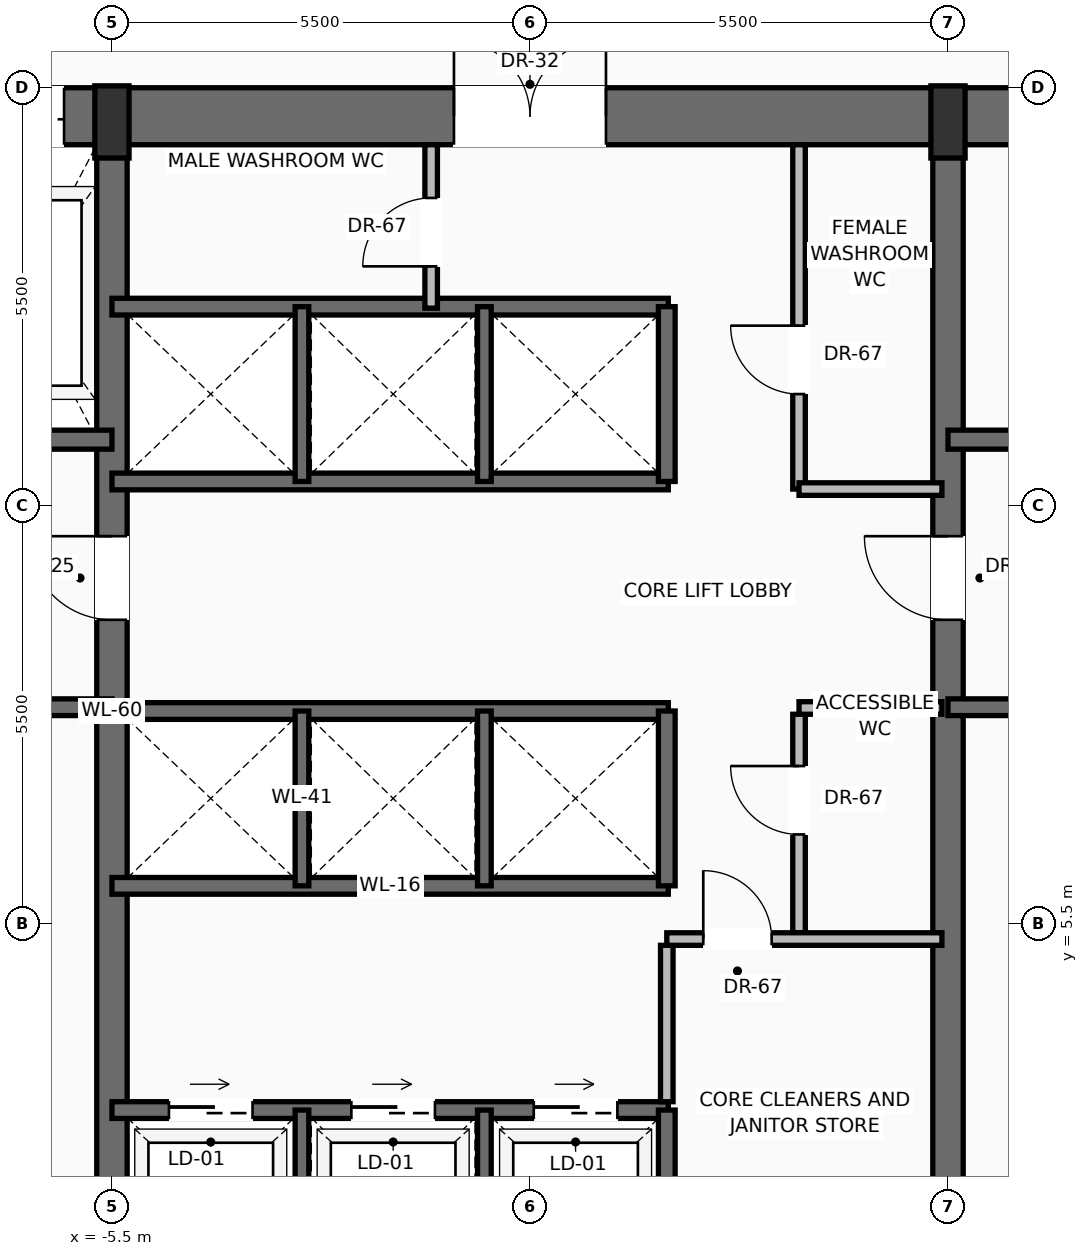
"""IFC4 building model, lengths in metres.
Left out: names, types, materials, properties, quantities, classifications, styles, units other than length and angle.
Written with IfcOpenShell. Run it as: python <this file> out.ifc"""

import sys

from ifc_helpers import new_model, si_unit, direction, frame, frame_2d, origin, origin_2d, place, context, subcontext, project, spatial, rectangle, extrude, source, transform, mapped, element, fill, save


model = new_model("IFC4")
c1 = context("Model", 3, precision=1e-05, world=origin(), true_north=direction((0.0, 1.0)))
c2 = subcontext(c1, "Body", "Model", "MODEL_VIEW")
j1 = project(units=[si_unit("LENGTHUNIT", "METRE"), si_unit("PLANEANGLEUNIT", "RADIAN")], contexts=[c1])
p1 = place(None, origin())
s1 = spatial("IfcSite", under=j1, at=p1, CompositionType="ELEMENT")
p2 = place(p1, origin())
s2 = spatial("IfcBuilding", under=s1, at=p2, CompositionType="ELEMENT")
p3 = place(p2, frame((0.0, 0.0, 113.6)))
s3 = spatial("IfcBuildingStorey", under=s2, at=p3, CompositionType="ELEMENT", Elevation=113.6)
p4 = place(p3, frame((-10.9, 16.125, 0.0), z_axis=(0.0, 0.0, 1.0), x_axis=(1.0, 0.0, 0.0)))
e1 = element("IfcWall", 1, at=p4, inside=s3, PredefinedType="SHEAR", context=c2, shape_type="SweptSolid", body=[
    extrude(rectangle(XDim=21.8, YDim=0.75, at=frame_2d((10.9, 0.0))), origin(), (0.0, 0.0, 1.0), 3.45),
])
p5 = place(p4, frame((3.47, 0.0, 0.0)))
e2 = element("IfcOpeningElement", 2, at=p5, cuts=e1, PredefinedType="OPENING", context=c2, shape_type="SweptSolid", body=[
    extrude(rectangle(XDim=1.3, YDim=2.3, at=frame_2d((0.65, 1.15))), frame((0.0, 0.385, 0.0), z_axis=(0.0, -1.0, 0.0), x_axis=(1.0, 0.0, 0.0)), (0.0, 0.0, 1.0), 0.77),
])
p6 = place(p4, frame((9.9, 0.0, 0.0)))
e3 = element("IfcOpeningElement", 3, at=p6, cuts=e1, PredefinedType="OPENING", context=c2, shape_type="SweptSolid", body=[
    extrude(rectangle(XDim=2.0, YDim=2.4, at=frame_2d((1.0, 1.2))), frame((0.0, 0.385, 0.0), z_axis=(0.0, -1.0, 0.0), x_axis=(1.0, 0.0, 0.0)), (0.0, 0.0, 1.0), 0.77),
])
p7 = place(p3, frame((-5.5, 0.475, 0.0), z_axis=(0.0, 0.0, 1.0), x_axis=(0.0, 1.0, 0.0)))
e4 = element("IfcWall", 4, at=p7, inside=s3, PredefinedType="SHEAR", context=c2, shape_type="SweptSolid", body=[
    extrude(rectangle(XDim=15.65, YDim=0.4, at=frame_2d((7.825, 0.0))), origin(), (0.0, 0.0, 1.0), 3.45),
])
p8 = place(p7, frame((9.025, 0.0, 0.0)))
e5 = element("IfcOpeningElement", 5, at=p8, cuts=e4, PredefinedType="OPENING", context=c2, shape_type="SweptSolid", body=[
    extrude(rectangle(XDim=1.1, YDim=2.2, at=frame_2d((0.55, 1.1))), frame((0.0, 0.21, 0.0), z_axis=(0.0, -1.0, 0.0), x_axis=(1.0, 0.0, 0.0)), (0.0, 0.0, 1.0), 0.42),
])
p9 = place(p3, frame((5.5, 0.475, 0.0), z_axis=(0.0, 0.0, 1.0), x_axis=(0.0, 1.0, 0.0)))
e6 = element("IfcWall", 6, at=p9, inside=s3, PredefinedType="SHEAR", context=c2, shape_type="SweptSolid", body=[
    extrude(rectangle(XDim=15.65, YDim=0.4, at=frame_2d((7.825, 0.0))), origin(), (0.0, 0.0, 1.0), 3.45),
])
p10 = place(p9, frame((9.025, 0.0, 0.0)))
e7 = element("IfcOpeningElement", 7, at=p10, cuts=e6, PredefinedType="OPENING", context=c2, shape_type="SweptSolid", body=[
    extrude(rectangle(XDim=1.1, YDim=2.2, at=frame_2d((0.55, 1.1))), frame((0.0, 0.21, 0.0), z_axis=(0.0, -1.0, 0.0), x_axis=(1.0, 0.0, 0.0)), (0.0, 0.0, 1.0), 0.42),
])
m1 = source(origin(), c2, "Body", "SweptSolid", [
    extrude(rectangle(XDim=0.45, YDim=0.95, at=origin_2d()), origin(), (0.0, 0.0, 1.0), 3.7),
])
for number, where, z_axis, x_axis in (
    (8, (-5.5, 16.05, 0.0), (0.0, 0.0, 1.0), (1.0, 0.0, 0.0)),
    (9, (5.5, 16.05, 0.0), (0.0, 0.0, 1.0), (1.0, 0.0, 0.0)),
):
    element("IfcColumn", number, at=place(p3, frame(where, z_axis=z_axis, x_axis=x_axis)), inside=s3, PredefinedType="PILASTER", context=c2, shape_type="MappedRepresentation", body=[
        mapped(m1, transform((0.0, 0.0, 0.0), scale=1.0)),
    ])
p11 = place(p3, frame((-5.5, 8.35, 0.0), z_axis=(0.0, 0.0, 1.0), x_axis=(-1.0, 0.0, 0.0)))
e10 = element("IfcWall", 10, at=p11, inside=s3, PredefinedType="SOLIDWALL", context=c2, shape_type="SweptSolid", body=[
    extrude(rectangle(XDim=4.65, YDim=0.22, at=frame_2d((2.325, 0.0))), origin(), (0.0, 0.0, 1.0), 3.45),
])
p12 = place(p11, frame((2.5, 0.0, 0.0)))
e11 = element("IfcOpeningElement", 11, at=p12, cuts=e10, PredefinedType="OPENING", context=c2, shape_type="SweptSolid", body=[
    extrude(rectangle(XDim=1.15, YDim=2.2, at=frame_2d((0.575, 1.1))), frame((0.0, 0.12, 0.0), z_axis=(0.0, -1.0, 0.0), x_axis=(1.0, 0.0, 0.0)), (0.0, 0.0, 1.0), 0.24),
])
p13 = place(p3, frame((-5.5, 11.87, 0.0), z_axis=(0.0, 0.0, 1.0), x_axis=(-1.0, 0.0, 0.0)))
e12 = element("IfcWall", 12, at=p13, inside=s3, PredefinedType="SOLIDWALL", context=c2, shape_type="SweptSolid", body=[
    extrude(rectangle(XDim=4.65, YDim=0.25, at=frame_2d((2.325, 0.0))), origin(), (0.0, 0.0, 1.0), 3.45),
])
p14 = place(p13, frame((2.95, 0.0, 0.0)))
e13 = element("IfcOpeningElement", 13, at=p14, cuts=e12, PredefinedType="OPENING", context=c2, shape_type="SweptSolid", body=[
    extrude(rectangle(XDim=1.2, YDim=2.25, at=frame_2d((0.6, 1.125))), frame((0.0, 0.135, 0.0), z_axis=(0.0, -1.0, 0.0), x_axis=(1.0, 0.0, 0.0)), (0.0, 0.0, 1.0), 0.27),
])
p15 = place(p3, frame((10.15, 8.35, 0.0), z_axis=(0.0, 0.0, 1.0), x_axis=(-1.0, 0.0, 0.0)))
e14 = element("IfcWall", 14, at=p15, inside=s3, PredefinedType="SOLIDWALL", context=c2, shape_type="SweptSolid", body=[
    extrude(rectangle(XDim=4.65, YDim=0.22, at=frame_2d((2.325, 0.0))), origin(), (0.0, 0.0, 1.0), 3.45),
])
p16 = place(p15, frame((1.0, 0.0, 0.0)))
e15 = element("IfcOpeningElement", 15, at=p16, cuts=e14, PredefinedType="OPENING", context=c2, shape_type="SweptSolid", body=[
    extrude(rectangle(XDim=1.15, YDim=2.2, at=frame_2d((0.575, 1.1))), frame((0.0, 0.12, 0.0), z_axis=(0.0, -1.0, 0.0), x_axis=(1.0, 0.0, 0.0)), (0.0, 0.0, 1.0), 0.24),
])
p17 = place(p3, frame((10.15, 11.87, 0.0), z_axis=(0.0, 0.0, 1.0), x_axis=(-1.0, 0.0, 0.0)))
e16 = element("IfcWall", 16, at=p17, inside=s3, PredefinedType="SOLIDWALL", context=c2, shape_type="SweptSolid", body=[
    extrude(rectangle(XDim=4.65, YDim=0.25, at=frame_2d((2.325, 0.0))), origin(), (0.0, 0.0, 1.0), 3.45),
])
p18 = place(p17, frame((0.5, 0.0, 0.0)))
e17 = element("IfcOpeningElement", 17, at=p18, cuts=e16, PredefinedType="OPENING", context=c2, shape_type="SweptSolid", body=[
    extrude(rectangle(XDim=1.2, YDim=2.25, at=frame_2d((0.6, 1.125))), frame((0.0, 0.135, 0.0), z_axis=(0.0, -1.0, 0.0), x_axis=(1.0, 0.0, 0.0)), (0.0, 0.0, 1.0), 0.27),
])
p19 = place(p3, frame((-5.5, 3.05, 0.0), z_axis=(0.0, 0.0, 1.0), x_axis=(1.0, 0.0, 0.0)))
e18 = element("IfcWall", 18, at=p19, inside=s3, PredefinedType="SOLIDWALL", context=c2, shape_type="SweptSolid", body=[
    extrude(rectangle(XDim=7.32, YDim=0.22, at=frame_2d((3.66, 0.0))), origin(), (0.0, 0.0, 1.0), 3.45),
])
p20 = place(p19, frame((0.75, 0.0, 0.0)))
e19 = element("IfcOpeningElement", 19, at=p20, cuts=e18, PredefinedType="OPENING", context=c2, shape_type="SweptSolid", body=[
    extrude(rectangle(XDim=1.1, YDim=2.2, at=frame_2d((0.55, 1.1))), frame((0.0, 0.12, 0.0), z_axis=(0.0, -1.0, 0.0), x_axis=(1.0, 0.0, 0.0)), (0.0, 0.0, 1.0), 0.24),
])
p21 = place(p19, frame((3.15, 0.0, 0.0)))
e20 = element("IfcOpeningElement", 20, at=p21, cuts=e18, PredefinedType="OPENING", context=c2, shape_type="SweptSolid", body=[
    extrude(rectangle(XDim=1.1, YDim=2.2, at=frame_2d((0.55, 1.1))), frame((0.0, 0.12, 0.0), z_axis=(0.0, -1.0, 0.0), x_axis=(1.0, 0.0, 0.0)), (0.0, 0.0, 1.0), 0.24),
])
p22 = place(p19, frame((5.55, 0.0, 0.0)))
e21 = element("IfcOpeningElement", 21, at=p22, cuts=e18, PredefinedType="OPENING", context=c2, shape_type="SweptSolid", body=[
    extrude(rectangle(XDim=1.1, YDim=2.2, at=frame_2d((0.55, 1.1))), frame((0.0, 0.12, 0.0), z_axis=(0.0, -1.0, 0.0), x_axis=(1.0, 0.0, 0.0)), (0.0, 0.0, 1.0), 0.24),
])
p23 = place(p3, frame((1.8, 0.85, 0.0), z_axis=(0.0, 0.0, 1.0), x_axis=(0.0, 1.0, 0.0)))
e22 = element("IfcWall", 22, at=p23, inside=s3, PredefinedType="SOLIDWALL", context=c2, shape_type="SweptSolid", body=[
    extrude(rectangle(XDim=2.2, YDim=0.22, at=frame_2d((1.1, 0.0))), origin(), (0.0, 0.0, 1.0), 3.45),
])
for number, where, z_axis, x_axis in (
    (23, (-3.0, 0.85, 0.0), (0.0, 0.0, 1.0), (0.0, 1.0, 0.0)),
    (24, (-0.6, 0.85, 0.0), (0.0, 0.0, 1.0), (0.0, 1.0, 0.0)),
):
    element("IfcWall", number, at=place(p3, frame(where, z_axis=z_axis, x_axis=x_axis)), inside=s3, PredefinedType="SOLIDWALL", context=c2, shape_type="SweptSolid", body=[
        extrude(rectangle(XDim=2.2, YDim=0.18, at=frame_2d((1.1, 0.0))), origin(), (0.0, 0.0, 1.0), 3.45),
    ])
p24 = place(p3, frame((1.8, 3.16, 0.0), z_axis=(0.0, 0.0, 1.0), x_axis=(0.0, 1.0, 0.0)))
e25 = element("IfcWall", 25, at=p24, inside=s3, PredefinedType="PARTITIONING", context=c2, shape_type="SweptSolid", body=[
    extrude(rectangle(XDim=2.058, YDim=0.165, at=frame_2d((1.029, 0.0))), origin(), (0.0, 0.0, 1.0), 3.442),
])
p25 = place(p3, frame((3.54, 5.383, 0.0), z_axis=(0.0, 0.0, 1.0), x_axis=(0.0, 1.0, 0.0)))
e26 = element("IfcWall", 26, at=p25, inside=s3, PredefinedType="PARTITIONING", context=c2, shape_type="SweptSolid", body=[
    extrude(rectangle(XDim=2.875, YDim=0.165, at=frame_2d((1.438, 0.0))), origin(), (0.0, 0.0, 1.0), 3.442),
])
p26 = place(p25, frame((1.294, 0.0, 0.0)))
e27 = element("IfcOpeningElement", 27, at=p26, cuts=e26, PredefinedType="OPENING", context=c2, shape_type="SweptSolid", body=[
    extrude(rectangle(XDim=0.9, YDim=2.1, at=frame_2d((0.45, 1.05))), frame((0.0, 0.093, 0.0), z_axis=(0.0, -1.0, 0.0), x_axis=(1.0, 0.0, 0.0)), (0.0, 0.0, 1.0), 0.185),
])
p27 = place(p3, frame((3.54, 8.34, 0.0), z_axis=(0.0, 0.0, 1.0), x_axis=(1.0, 0.0, 0.0)))
e28 = element("IfcWall", 28, at=p27, inside=s3, PredefinedType="PARTITIONING", context=c2, shape_type="SweptSolid", body=[
    extrude(rectangle(XDim=1.88, YDim=0.165, at=frame_2d((0.94, 0.0))), origin(), (0.0, 0.0, 1.0), 3.442),
])
p28 = place(p3, frame((1.8, 5.3, 0.0), z_axis=(0.0, 0.0, 1.0), x_axis=(1.0, 0.0, 0.0)))
e29 = element("IfcWall", 29, at=p28, inside=s3, PredefinedType="PARTITIONING", context=c2, shape_type="SweptSolid", body=[
    extrude(rectangle(XDim=3.62, YDim=0.165, at=frame_2d((1.81, 0.0))), origin(), (0.0, 0.0, 1.0), 3.442),
])
p29 = place(p28, frame((0.48, 0.0, 0.0)))
e30 = element("IfcOpeningElement", 30, at=p29, cuts=e29, PredefinedType="OPENING", context=c2, shape_type="SweptSolid", body=[
    extrude(rectangle(XDim=0.9, YDim=2.1, at=frame_2d((0.45, 1.05))), frame((0.0, 0.093, 0.0), z_axis=(0.0, -1.0, 0.0), x_axis=(1.0, 0.0, 0.0)), (0.0, 0.0, 1.0), 0.185),
])
for number, where, z_axis, x_axis in (
    (31, (-5.5, 6.0, 0.0), (0.0, 0.0, 1.0), (1.0, 0.0, 0.0)),
    (32, (-5.5, 8.3, 0.0), (0.0, 0.0, 1.0), (1.0, 0.0, 0.0)),
):
    element("IfcWall", number, at=place(p3, frame(where, z_axis=z_axis, x_axis=x_axis)), inside=s3, PredefinedType="SOLIDWALL", context=c2, shape_type="SweptSolid", body=[
        extrude(rectangle(XDim=7.32, YDim=0.22, at=frame_2d((3.66, 0.0))), origin(), (0.0, 0.0, 1.0), 3.45),
    ])
p30 = place(p3, frame((1.8, 6.0, 0.0), z_axis=(0.0, 0.0, 1.0), x_axis=(0.0, 1.0, 0.0)))
e33 = element("IfcWall", 33, at=p30, inside=s3, PredefinedType="SOLIDWALL", context=c2, shape_type="SweptSolid", body=[
    extrude(rectangle(XDim=2.3, YDim=0.22, at=frame_2d((1.15, 0.0))), origin(), (0.0, 0.0, 1.0), 3.45),
])
for number, where, z_axis, x_axis in (
    (34, (-3.0, 6.0, 0.0), (0.0, 0.0, 1.0), (0.0, 1.0, 0.0)),
    (35, (-0.6, 6.0, 0.0), (0.0, 0.0, 1.0), (0.0, 1.0, 0.0)),
):
    element("IfcWall", number, at=place(p3, frame(where, z_axis=z_axis, x_axis=x_axis)), inside=s3, PredefinedType="SOLIDWALL", context=c2, shape_type="SweptSolid", body=[
        extrude(rectangle(XDim=2.3, YDim=0.18, at=frame_2d((1.15, 0.0))), origin(), (0.0, 0.0, 1.0), 3.45),
    ])
for number, where, z_axis, x_axis in (
    (36, (-5.5, 11.32, 0.0), (0.0, 0.0, 1.0), (1.0, 0.0, 0.0)),
    (37, (-5.5, 13.62, 0.0), (0.0, 0.0, 1.0), (1.0, 0.0, 0.0)),
):
    element("IfcWall", number, at=place(p3, frame(where, z_axis=z_axis, x_axis=x_axis)), inside=s3, PredefinedType="SOLIDWALL", context=c2, shape_type="SweptSolid", body=[
        extrude(rectangle(XDim=7.32, YDim=0.22, at=frame_2d((3.66, 0.0))), origin(), (0.0, 0.0, 1.0), 3.45),
    ])
p31 = place(p3, frame((1.8, 11.32, 0.0), z_axis=(0.0, 0.0, 1.0), x_axis=(0.0, 1.0, 0.0)))
e38 = element("IfcWall", 38, at=p31, inside=s3, PredefinedType="SOLIDWALL", context=c2, shape_type="SweptSolid", body=[
    extrude(rectangle(XDim=2.3, YDim=0.22, at=frame_2d((1.15, 0.0))), origin(), (0.0, 0.0, 1.0), 3.45),
])
for number, where, z_axis, x_axis in (
    (39, (-3.0, 11.32, 0.0), (0.0, 0.0, 1.0), (0.0, 1.0, 0.0)),
    (40, (-0.6, 11.32, 0.0), (0.0, 0.0, 1.0), (0.0, 1.0, 0.0)),
):
    element("IfcWall", number, at=place(p3, frame(where, z_axis=z_axis, x_axis=x_axis)), inside=s3, PredefinedType="SOLIDWALL", context=c2, shape_type="SweptSolid", body=[
        extrude(rectangle(XDim=2.3, YDim=0.18, at=frame_2d((1.15, 0.0))), origin(), (0.0, 0.0, 1.0), 3.45),
    ])
p32 = place(p3, frame((-1.3, 13.6, 0.0), z_axis=(0.0, 0.0, 1.0), x_axis=(0.0, 1.0, 0.0)))
e41 = element("IfcWall", 41, at=p32, inside=s3, PredefinedType="PARTITIONING", context=c2, shape_type="SweptSolid", body=[
    extrude(rectangle(XDim=2.15, YDim=0.165, at=frame_2d((1.075, 0.0))), origin(), (0.0, 0.0, 1.0), 3.442),
])
p33 = place(p32, frame((0.55, 0.0, 0.0)))
e42 = element("IfcOpeningElement", 42, at=p33, cuts=e41, PredefinedType="OPENING", context=c2, shape_type="SweptSolid", body=[
    extrude(rectangle(XDim=0.9, YDim=2.1, at=frame_2d((0.45, 1.05))), frame((0.0, 0.093, 0.0), z_axis=(0.0, -1.0, 0.0), x_axis=(1.0, 0.0, 0.0)), (0.0, 0.0, 1.0), 0.185),
])
p34 = place(p3, frame((3.54, 11.22, 0.0), z_axis=(0.0, 0.0, 1.0), x_axis=(0.0, 1.0, 0.0)))
e43 = element("IfcWall", 43, at=p34, inside=s3, PredefinedType="PARTITIONING", context=c2, shape_type="SweptSolid", body=[
    extrude(rectangle(XDim=4.53, YDim=0.165, at=frame_2d((2.265, 0.0))), origin(), (0.0, 0.0, 1.0), 3.442),
])
p35 = place(p34, frame((1.25, 0.0, 0.0)))
e44 = element("IfcOpeningElement", 44, at=p35, cuts=e43, PredefinedType="OPENING", context=c2, shape_type="SweptSolid", body=[
    extrude(rectangle(XDim=0.9, YDim=2.1, at=frame_2d((0.45, 1.05))), frame((0.0, 0.093, 0.0), z_axis=(0.0, -1.0, 0.0), x_axis=(1.0, 0.0, 0.0)), (0.0, 0.0, 1.0), 0.185),
])
p36 = place(p3, frame((3.54, 11.22, 0.0), z_axis=(0.0, 0.0, 1.0), x_axis=(1.0, 0.0, 0.0)))
e45 = element("IfcWall", 45, at=p36, inside=s3, PredefinedType="PARTITIONING", context=c2, shape_type="SweptSolid", body=[
    extrude(rectangle(XDim=1.88, YDim=0.165, at=frame_2d((0.94, 0.0))), origin(), (0.0, 0.0, 1.0), 3.442),
])
m2 = source(origin(), c2, "Body", "SweptSolid", [
    extrude(rectangle(XDim=1.1, YDim=2.2, at=frame_2d((0.55, 1.1))), frame((0.0, 0.025, 0.0), z_axis=(0.0, -1.0, 0.0), x_axis=(1.0, 0.0, 0.0)), (0.0, 0.0, 1.0), 0.05),
])
p37 = place(p8, origin())
e46 = element("IfcDoor", 46, at=p37, inside=s3, OperationType="SINGLE_SWING_RIGHT", PredefinedType="DOOR", context=c2, shape_type="MappedRepresentation", body=[
    mapped(m2, transform((0.0, 0.0, 0.0), scale=1.0)),
])
fill(e5, e46)
m3 = source(origin(), c2, "Body", "SweptSolid", [
    extrude(rectangle(XDim=1.3, YDim=2.3, at=frame_2d((0.65, 1.15))), frame((0.0, 0.025, 0.0), z_axis=(0.0, -1.0, 0.0), x_axis=(1.0, 0.0, 0.0)), (0.0, 0.0, 1.0), 0.05),
])
p38 = place(p5, origin())
e47 = element("IfcDoor", 47, at=p38, inside=s3, OperationType="SLIDING_TO_RIGHT", PredefinedType="DOOR", context=c2, shape_type="MappedRepresentation", body=[
    mapped(m3, transform((0.0, 0.0, 0.0), scale=1.0)),
])
fill(e2, e47)
p39 = place(p10, origin())
e48 = element("IfcDoor", 48, at=p39, inside=s3, OperationType="SINGLE_SWING_RIGHT", PredefinedType="DOOR", context=c2, shape_type="MappedRepresentation", body=[
    mapped(m2, transform((0.0, 0.0, 0.0), scale=1.0)),
])
fill(e7, e48)
m4 = source(origin(), c2, "Body", "SweptSolid", [
    extrude(rectangle(XDim=2.0, YDim=2.4, at=frame_2d((1.0, 1.2))), frame((0.0, 0.025, 0.0), z_axis=(0.0, -1.0, 0.0), x_axis=(1.0, 0.0, 0.0)), (0.0, 0.0, 1.0), 0.05),
])
p40 = place(p6, origin())
e49 = element("IfcDoor", 49, at=p40, inside=s3, OperationType="DOUBLE_DOOR_SINGLE_SWING", PredefinedType="DOOR", context=c2, shape_type="MappedRepresentation", body=[
    mapped(m4, transform((0.0, 0.0, 0.0), scale=1.0)),
])
fill(e3, e49)
m5 = source(origin(), c2, "Body", "SweptSolid", [
    extrude(rectangle(XDim=1.1, YDim=2.2, at=frame_2d((0.55, 1.1))), frame((0.0, 0.025, 0.0), z_axis=(0.0, -1.0, 0.0), x_axis=(1.0, 0.0, 0.0)), (0.0, 0.0, 1.0), 0.05),
])
p41 = place(p20, origin())
e50 = element("IfcDoor", 50, at=p41, inside=s3, OperationType="SLIDING_TO_RIGHT", PredefinedType="DOOR", context=c2, shape_type="MappedRepresentation", body=[
    mapped(m5, transform((0.0, 0.0, 0.0), scale=1.0)),
])
fill(e19, e50)
p42 = place(p21, origin())
e51 = element("IfcDoor", 51, at=p42, inside=s3, OperationType="SLIDING_TO_RIGHT", PredefinedType="DOOR", context=c2, shape_type="MappedRepresentation", body=[
    mapped(m5, transform((0.0, 0.0, 0.0), scale=1.0)),
])
fill(e20, e51)
p43 = place(p22, origin())
e52 = element("IfcDoor", 52, at=p43, inside=s3, OperationType="SLIDING_TO_RIGHT", PredefinedType="DOOR", context=c2, shape_type="MappedRepresentation", body=[
    mapped(m5, transform((0.0, 0.0, 0.0), scale=1.0)),
])
fill(e21, e52)
m6 = source(origin(), c2, "Body", "SweptSolid", [
    extrude(rectangle(XDim=0.9, YDim=2.1, at=frame_2d((0.45, 1.05))), frame((0.0, 0.025, 0.0), z_axis=(0.0, -1.0, 0.0), x_axis=(1.0, 0.0, 0.0)), (0.0, 0.0, 1.0), 0.05),
])
p44 = place(p29, origin())
e53 = element("IfcDoor", 53, at=p44, inside=s3, OperationType="SINGLE_SWING_LEFT", PredefinedType="DOOR", context=c2, shape_type="MappedRepresentation", body=[
    mapped(m6, transform((0.0, 0.0, 0.0), scale=1.0)),
])
fill(e30, e53)
p45 = place(p26, origin())
e54 = element("IfcDoor", 54, at=p45, inside=s3, OperationType="SINGLE_SWING_RIGHT", PredefinedType="DOOR", context=c2, shape_type="MappedRepresentation", body=[
    mapped(m6, transform((0.0, 0.0, 0.0), scale=1.0)),
])
fill(e27, e54)
p46 = place(p33, origin())
e55 = element("IfcDoor", 55, at=p46, inside=s3, OperationType="SINGLE_SWING_LEFT", PredefinedType="DOOR", context=c2, shape_type="MappedRepresentation", body=[
    mapped(m6, transform((0.0, 0.0, 0.0), scale=1.0)),
])
fill(e42, e55)
p47 = place(p35, origin())
e56 = element("IfcDoor", 56, at=p47, inside=s3, OperationType="SINGLE_SWING_RIGHT", PredefinedType="DOOR", context=c2, shape_type="MappedRepresentation", body=[
    mapped(m6, transform((0.0, 0.0, 0.0), scale=1.0)),
])
fill(e44, e56)
save(model, sys.argv[1])
